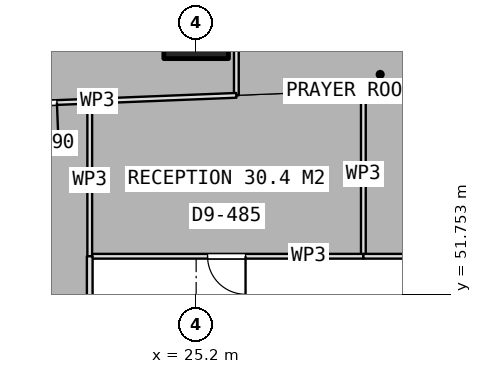
"""IFC4 building model, lengths in metres.
Left out: names, types, materials, properties, quantities, classifications, styles, units other than length and angle.
Written with IfcOpenShell. Run it as: python <this file> out.ifc"""

import sys

from ifc_helpers import new_model, si_unit, direction, frame, frame_2d, origin, origin_2d, place, context, subcontext, project, spatial, rectangle, extrude, element, fill, save


model = new_model("IFC4")
c1 = context("Model", 3, precision=1e-05, world=origin(), true_north=direction((0.0, 1.0)))
c2 = subcontext(c1, "Body", "Model", "MODEL_VIEW")
j1 = project(units=[si_unit("LENGTHUNIT", "METRE"), si_unit("PLANEANGLEUNIT", "RADIAN")], contexts=[c1])
p1 = place(None, origin())
s1 = spatial("IfcSite", under=j1, at=p1, CompositionType="ELEMENT")
p2 = place(p1, origin())
s2 = spatial("IfcBuilding", under=s1, at=p2, CompositionType="ELEMENT")
p3 = place(p2, frame((0.0, 0.0, 125.3)))
s3 = spatial("IfcBuildingStorey", under=s2, at=p3, CompositionType="ELEMENT", Elevation=125.3)
p4 = place(p3, frame((25.2, 58.8, 0.0), z_axis=(0.0, 0.0, 1.0), x_axis=(1.0, 0.0, 0.0)))
e1 = element("IfcColumn", 1, at=p4, inside=s3, PredefinedType="COLUMN", context=c2, shape_type="SweptSolid", body=[
    extrude(rectangle(XDim=1.7, YDim=1.7, at=origin_2d()), origin(), (0.0, 0.0, 1.0), 3.75),
])
p5 = place(p3, frame((26.258, 56.984, 0.0), z_axis=(0.0, 0.0, 1.0), x_axis=(0.0, 1.0, 0.0)))
e2 = element("IfcWall", 2, at=p5, inside=s3, PredefinedType="PARTITIONING", context=c2, shape_type="SweptSolid", body=[
    extrude(rectangle(XDim=4.153, YDim=0.125, at=frame_2d((2.077, 0.0))), origin(), (0.0, 0.0, 1.0), 3.5),
])
p6 = place(p3, frame((26.257, 56.984, 0.0), z_axis=(0.0, 0.0, 1.0), x_axis=(-0.999199876108, -0.039995094524, 0.0)))
e3 = element("IfcWall", 3, at=p6, inside=s3, PredefinedType="PARTITIONING", context=c2, shape_type="SweptSolid", body=[
    extrude(rectangle(XDim=10.45, YDim=0.125, at=frame_2d((5.225, 0.0))), origin(), (0.0, 0.0, 1.0), 3.5),
])
p7 = place(p6, frame((4.725, 0.0, 0.0)))
e4 = element("IfcOpeningElement", 4, at=p7, cuts=e3, PredefinedType="OPENING", context=c2, shape_type="SweptSolid", body=[
    extrude(rectangle(XDim=1.0, YDim=2.1, at=frame_2d((0.5, 1.05))), frame((0.0, 0.073, 0.0), z_axis=(0.0, -1.0, 0.0), x_axis=(1.0, 0.0, 0.0)), (0.0, 0.0, 1.0), 0.145),
])
p8 = place(p3, frame((29.6, 57.055, 0.0), z_axis=(0.0, 0.0, 1.0), x_axis=(0.0, -1.0, 0.0)))
e5 = element("IfcWall", 5, at=p8, inside=s3, PredefinedType="PARTITIONING", context=c2, shape_type="SweptSolid", body=[
    extrude(rectangle(XDim=4.305, YDim=0.125, at=frame_2d((2.152, 0.0))), origin(), (0.0, 0.0, 1.0), 3.5),
])
p9 = place(p3, frame((29.6, 52.75, 0.0), z_axis=(0.0, 0.0, 1.0), x_axis=(-1.0, 0.0, 0.0)))
e6 = element("IfcWall", 6, at=p9, inside=s3, PredefinedType="PARTITIONING", context=c2, shape_type="SweptSolid", body=[
    extrude(rectangle(XDim=7.2, YDim=0.125, at=frame_2d((3.6, 0.0))), origin(), (0.0, 0.0, 1.0), 3.5),
])
p10 = place(p9, frame((3.1, 0.0, 0.0)))
e7 = element("IfcOpeningElement", 7, at=p10, cuts=e6, PredefinedType="OPENING", context=c2, shape_type="SweptSolid", body=[
    extrude(rectangle(XDim=1.0, YDim=2.1, at=frame_2d((0.5, 1.05))), frame((0.0, 0.073, 0.0), z_axis=(0.0, -1.0, 0.0), x_axis=(1.0, 0.0, 0.0)), (0.0, 0.0, 1.0), 0.145),
])
p11 = place(p3, frame((22.4, 52.75, 0.0), z_axis=(0.0, 0.0, 1.0), x_axis=(0.0, 1.0, 0.0)))
e8 = element("IfcWall", 8, at=p11, inside=s3, PredefinedType="PARTITIONING", context=c2, shape_type="SweptSolid", body=[
    extrude(rectangle(XDim=4.017, YDim=0.125, at=frame_2d((2.009, 0.0))), origin(), (0.0, 0.0, 1.0), 3.5),
])
p12 = place(p3, frame((33.826, 52.75, 0.0), z_axis=(0.0, 0.0, 1.0), x_axis=(-1.0, 0.0, 0.0)))
e9 = element("IfcWall", 9, at=p12, inside=s3, PredefinedType="PARTITIONING", context=c2, shape_type="SweptSolid", body=[
    extrude(rectangle(XDim=4.226, YDim=0.125, at=frame_2d((2.113, 0.0))), origin(), (0.0, 0.0, 1.0), 3.5),
])
p13 = place(p3, frame((22.4, 52.75, 0.0), z_axis=(0.0, 0.0, 1.0), x_axis=(0.0, -1.0, 0.0)))
e10 = element("IfcWall", 10, at=p13, inside=s3, PredefinedType="PARTITIONING", context=c2, shape_type="SweptSolid", body=[
    extrude(rectangle(XDim=9.877, YDim=0.15, at=frame_2d((4.938, 0.0))), origin(), (0.0, 0.0, 1.0), 3.5),
])
p14 = place(p13, frame((4.439, 0.0, 0.0)))
e11 = element("IfcOpeningElement", 11, at=p14, cuts=e10, PredefinedType="OPENING", context=c2, shape_type="SweptSolid", body=[
    extrude(rectangle(XDim=1.0, YDim=2.1, at=frame_2d((0.5, 1.05))), frame((0.0, 0.085, 0.0), z_axis=(0.0, -1.0, 0.0), x_axis=(1.0, 0.0, 0.0)), (0.0, 0.0, 1.0), 0.17),
])
p15 = place(p7, origin())
e12 = element("IfcDoor", 12, at=p15, inside=s3, OperationType="SINGLE_SWING_LEFT", PredefinedType="DOOR", context=c2, shape_type="SweptSolid", body=[
    extrude(rectangle(XDim=1.0, YDim=2.1, at=frame_2d((0.5, 1.05))), frame((0.0, 0.025, 0.0), z_axis=(0.0, -1.0, 0.0), x_axis=(1.0, 0.0, 0.0)), (0.0, 0.0, 1.0), 0.05),
])
fill(e4, e12)
p16 = place(p10, origin())
e13 = element("IfcDoor", 13, at=p16, inside=s3, OperationType="SINGLE_SWING_LEFT", PredefinedType="DOOR", context=c2, shape_type="SweptSolid", body=[
    extrude(rectangle(XDim=1.0, YDim=2.1, at=frame_2d((0.5, 1.05))), frame((0.0, 0.025, 0.0), z_axis=(0.0, -1.0, 0.0), x_axis=(1.0, 0.0, 0.0)), (0.0, 0.0, 1.0), 0.05),
])
fill(e7, e13)
save(model, sys.argv[1])
